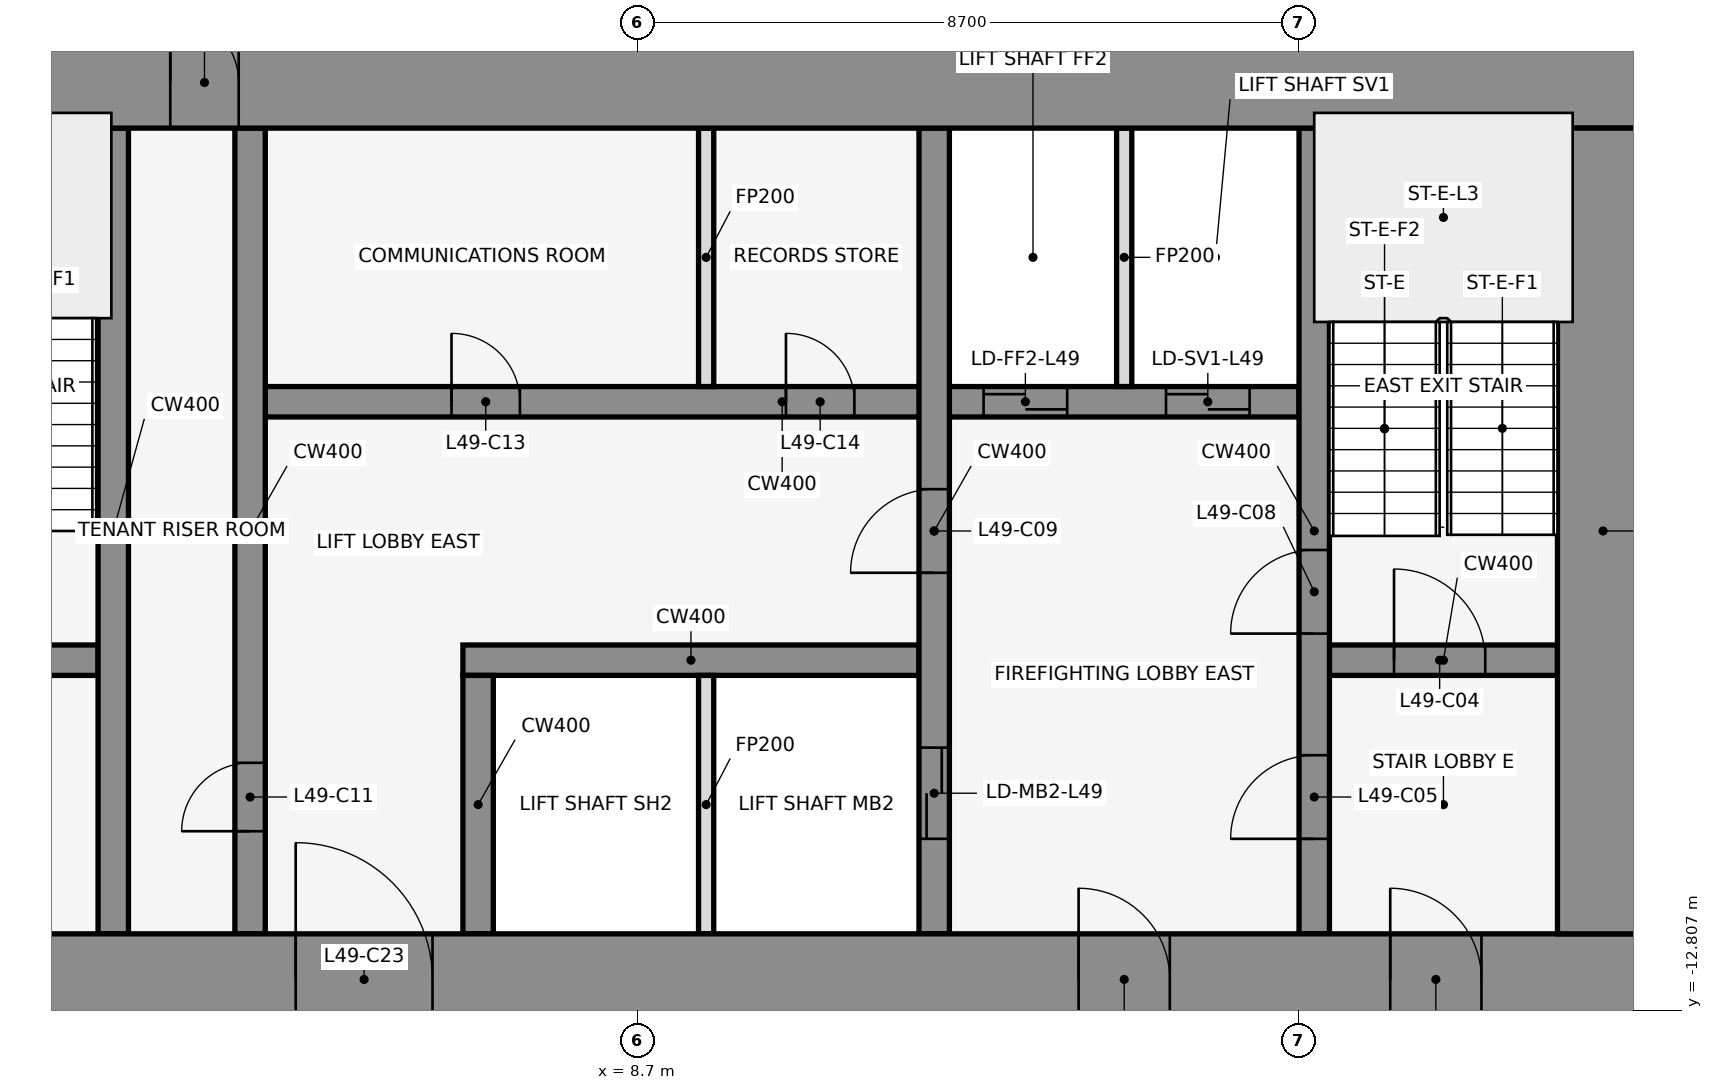
"""IFC4 building model, lengths in metres.
Left out: names, types, materials, properties, quantities, classifications, styles, units other than length and angle.
Written with IfcOpenShell. Run it as: python <this file> out.ifc"""

import sys

from ifc_helpers import new_model, si_unit, direction, frame, frame_2d, origin, place, context, subcontext, project, spatial, rectangle, extrude, element, fill, save


model = new_model("IFC4")
c1 = context("Model", 3, precision=1e-05, world=origin(), true_north=direction((0.0, 1.0)))
c2 = subcontext(c1, "Body", "Model", "MODEL_VIEW")
j1 = project(units=[si_unit("LENGTHUNIT", "METRE"), si_unit("PLANEANGLEUNIT", "RADIAN")], contexts=[c1])
p1 = place(None, origin())
s1 = spatial("IfcSite", under=j1, at=p1, CompositionType="ELEMENT")
p2 = place(p1, origin())
s2 = spatial("IfcBuilding", under=s1, at=p2, CompositionType="ELEMENT")
p3 = place(p2, frame((0.0, 0.0, 219.6)))
s3 = spatial("IfcBuildingStorey", under=s2, at=p3, CompositionType="ELEMENT", Elevation=219.6)
for number, where, z_axis, x_axis in (
    (1, (16.432, -0.105, 0.0), (0.0, 0.0, 1.0), (-0.84, 0.543, 0.0)),
    (2, (1.901, 1.08, 0.0), (0.0, 0.0, 1.0), (-0.84, -0.543, 0.0)),
):
    element("IfcWall", number, at=place(p3, frame(where, z_axis=z_axis, x_axis=x_axis)), inside=s3, PredefinedType="STANDARD", context=c2, shape_type="SweptSolid", body=[
        extrude(rectangle(XDim=2.183, YDim=0.25, at=frame_2d((1.091, 0.0))), origin(), (0.0, 0.0, 1.0), 3.95),
    ])
p4 = place(p3, frame((-1.6, -8.2, 0.0), z_axis=(0.0, 0.0, 1.0), x_axis=(1.0, 0.0, 0.0)))
e3 = element("IfcWall", 3, at=p4, inside=s3, PredefinedType="SHEAR", context=c2, shape_type="SweptSolid", body=[
    extrude(rectangle(XDim=3.2, YDim=0.4, at=frame_2d((1.6, 0.0))), origin(), (0.0, 0.0, 1.0), 4.1),
])
p5 = place(p4, frame((1.05, 0.0, 0.0)))
e4 = element("IfcOpeningElement", 4, at=p5, cuts=e3, PredefinedType="OPENING", context=c2, shape_type="SweptSolid", body=[
    extrude(rectangle(XDim=1.2, YDim=2.1, at=frame_2d((0.6, 1.05))), frame((0.0, 0.212, 0.0), z_axis=(0.0, -1.0, 0.0), x_axis=(1.0, 0.0, 0.0)), (0.0, 0.0, 1.0), 0.424),
])
p6 = place(p3, frame((6.4, -8.2, 0.0), z_axis=(0.0, 0.0, 1.0), x_axis=(1.0, 0.0, 0.0)))
e5 = element("IfcWall", 5, at=p6, inside=s3, PredefinedType="SHEAR", context=c2, shape_type="SweptSolid", body=[
    extrude(rectangle(XDim=6.0, YDim=0.4, at=frame_2d((3.0, 0.0))), origin(), (0.0, 0.0, 1.0), 4.1),
])
p7 = place(p3, frame((17.8, -8.2, 0.0), z_axis=(0.0, 0.0, 1.0), x_axis=(1.0, 0.0, 0.0)))
e6 = element("IfcWall", 6, at=p7, inside=s3, PredefinedType="SHEAR", context=c2, shape_type="SweptSolid", body=[
    extrude(rectangle(XDim=3.0, YDim=0.4, at=frame_2d((1.5, 0.0))), origin(), (0.0, 0.0, 1.0), 4.1),
])
p8 = place(p7, frame((0.85, 0.0, 0.0)))
e7 = element("IfcOpeningElement", 7, at=p8, cuts=e6, PredefinedType="OPENING", context=c2, shape_type="SweptSolid", body=[
    extrude(rectangle(XDim=1.2, YDim=2.1, at=frame_2d((0.6, 1.05))), frame((0.0, 0.212, 0.0), z_axis=(0.0, -1.0, 0.0), x_axis=(1.0, 0.0, 0.0)), (0.0, 0.0, 1.0), 0.424),
])
p9 = place(p3, frame((3.8, -4.8, 0.0), z_axis=(0.0, 0.0, 1.0), x_axis=(1.0, 0.0, 0.0)))
e8 = element("IfcWall", 8, at=p9, inside=s3, PredefinedType="SHEAR", context=c2, shape_type="SweptSolid", body=[
    extrude(rectangle(XDim=13.6, YDim=0.4, at=frame_2d((6.8, 0.0))), origin(), (0.0, 0.0, 1.0), 4.1),
])
p10 = place(p9, frame((9.45, 0.0, 0.0)))
e9 = element("IfcOpeningElement", 9, at=p10, cuts=e8, PredefinedType="OPENING", context=c2, shape_type="SweptSolid", body=[
    extrude(rectangle(XDim=1.1, YDim=2.1, at=frame_2d((0.55, 1.05))), frame((0.0, 0.212, 0.0), z_axis=(0.0, -1.0, 0.0), x_axis=(1.0, 0.0, 0.0)), (0.0, 0.0, 1.0), 0.424),
])
p11 = place(p9, frame((11.85, 0.0, 0.0)))
e10 = element("IfcOpeningElement", 10, at=p11, cuts=e8, PredefinedType="OPENING", context=c2, shape_type="SweptSolid", body=[
    extrude(rectangle(XDim=1.1, YDim=2.1, at=frame_2d((0.55, 1.05))), frame((0.0, 0.212, 0.0), z_axis=(0.0, -1.0, 0.0), x_axis=(1.0, 0.0, 0.0)), (0.0, 0.0, 1.0), 0.424),
])
p12 = place(p9, frame((2.45, 0.0, 0.0)))
e11 = element("IfcOpeningElement", 11, at=p12, cuts=e8, PredefinedType="OPENING", context=c2, shape_type="SweptSolid", body=[
    extrude(rectangle(XDim=0.9, YDim=2.1, at=frame_2d((0.45, 1.05))), frame((0.0, 0.212, 0.0), z_axis=(0.0, -1.0, 0.0), x_axis=(1.0, 0.0, 0.0)), (0.0, 0.0, 1.0), 0.424),
])
p13 = place(p9, frame((6.85, 0.0, 0.0)))
e12 = element("IfcOpeningElement", 12, at=p13, cuts=e8, PredefinedType="OPENING", context=c2, shape_type="SweptSolid", body=[
    extrude(rectangle(XDim=0.9, YDim=2.1, at=frame_2d((0.45, 1.05))), frame((0.0, 0.212, 0.0), z_axis=(0.0, -1.0, 0.0), x_axis=(1.0, 0.0, 0.0)), (0.0, 0.0, 1.0), 0.424),
])
p14 = place(p3, frame((1.8, -11.8, 0.0), z_axis=(0.0, 0.0, 1.0), x_axis=(0.0, 1.0, 0.0)))
e13 = element("IfcWall", 13, at=p14, inside=s3, PredefinedType="SHEAR", context=c2, shape_type="SweptSolid", body=[
    extrude(rectangle(XDim=10.6, YDim=0.4, at=frame_2d((5.3, 0.0))), origin(), (0.0, 0.0, 1.0), 4.1),
])
p15 = place(p3, frame((3.6, -11.8, 0.0), z_axis=(0.0, 0.0, 1.0), x_axis=(0.0, 1.0, 0.0)))
e14 = element("IfcWall", 14, at=p15, inside=s3, PredefinedType="SHEAR", context=c2, shape_type="SweptSolid", body=[
    extrude(rectangle(XDim=10.6, YDim=0.4, at=frame_2d((5.3, 0.0))), origin(), (0.0, 0.0, 1.0), 4.1),
])
p16 = place(p15, frame((1.35, 0.0, 0.0)))
e15 = element("IfcOpeningElement", 15, at=p16, cuts=e14, PredefinedType="OPENING", context=c2, shape_type="SweptSolid", body=[
    extrude(rectangle(XDim=0.9, YDim=2.1, at=frame_2d((0.45, 1.05))), frame((0.0, 0.212, 0.0), z_axis=(0.0, -1.0, 0.0), x_axis=(1.0, 0.0, 0.0)), (0.0, 0.0, 1.0), 0.424),
])
p17 = place(p3, frame((6.6, -11.8, 0.0), z_axis=(0.0, 0.0, 1.0), x_axis=(0.0, 1.0, 0.0)))
e16 = element("IfcWall", 16, at=p17, inside=s3, PredefinedType="SHEAR", context=c2, shape_type="SweptSolid", body=[
    extrude(rectangle(XDim=3.4, YDim=0.4, at=frame_2d((1.7, 0.0))), origin(), (0.0, 0.0, 1.0), 4.1),
])
for number, where, z_axis, x_axis in (
    (17, (9.6, -11.8, 0.0), (0.0, 0.0, 1.0), (0.0, 1.0, 0.0)),
    (18, (9.6, -4.6, 0.0), (0.0, 0.0, 1.0), (0.0, 1.0, 0.0)),
):
    element("IfcWall", number, at=place(p3, frame(where, z_axis=z_axis, x_axis=x_axis)), inside=s3, PredefinedType="PARTITIONING", context=c2, shape_type="SweptSolid", body=[
        extrude(rectangle(XDim=3.4, YDim=0.2, at=frame_2d((1.7, 0.0))), origin(), (0.0, 0.0, 1.0), 2.84),
    ])
p18 = place(p3, frame((12.6, -11.8, 0.0), z_axis=(0.0, 0.0, 1.0), x_axis=(0.0, 1.0, 0.0)))
e19 = element("IfcWall", 19, at=p18, inside=s3, PredefinedType="SHEAR", context=c2, shape_type="SweptSolid", body=[
    extrude(rectangle(XDim=10.6, YDim=0.4, at=frame_2d((5.3, 0.0))), origin(), (0.0, 0.0, 1.0), 4.1),
])
p19 = place(p18, frame((1.25, 0.0, 0.0)))
e20 = element("IfcOpeningElement", 20, at=p19, cuts=e19, PredefinedType="OPENING", context=c2, shape_type="SweptSolid", body=[
    extrude(rectangle(XDim=1.2, YDim=2.1, at=frame_2d((0.6, 1.05))), frame((0.0, 0.212, 0.0), z_axis=(0.0, -1.0, 0.0), x_axis=(1.0, 0.0, 0.0)), (0.0, 0.0, 1.0), 0.424),
])
p20 = place(p18, frame((4.75, 0.0, 0.0)))
e21 = element("IfcOpeningElement", 21, at=p20, cuts=e19, PredefinedType="OPENING", context=c2, shape_type="SweptSolid", body=[
    extrude(rectangle(XDim=1.1, YDim=2.1, at=frame_2d((0.55, 1.05))), frame((0.0, 0.212, 0.0), z_axis=(0.0, -1.0, 0.0), x_axis=(1.0, 0.0, 0.0)), (0.0, 0.0, 1.0), 0.424),
])
p21 = place(p3, frame((15.1, -4.6, 0.0), z_axis=(0.0, 0.0, 1.0), x_axis=(0.0, 1.0, 0.0)))
e22 = element("IfcWall", 22, at=p21, inside=s3, PredefinedType="PARTITIONING", context=c2, shape_type="SweptSolid", body=[
    extrude(rectangle(XDim=3.4, YDim=0.2, at=frame_2d((1.7, 0.0))), origin(), (0.0, 0.0, 1.0), 2.84),
])
p22 = place(p3, frame((17.6, -11.8, 0.0), z_axis=(0.0, 0.0, 1.0), x_axis=(0.0, 1.0, 0.0)))
e23 = element("IfcWall", 23, at=p22, inside=s3, PredefinedType="SHEAR", context=c2, shape_type="SweptSolid", body=[
    extrude(rectangle(XDim=10.6, YDim=0.4, at=frame_2d((5.3, 0.0))), origin(), (0.0, 0.0, 1.0), 4.1),
])
p23 = place(p22, frame((1.25, 0.0, 0.0)))
e24 = element("IfcOpeningElement", 24, at=p23, cuts=e23, PredefinedType="OPENING", context=c2, shape_type="SweptSolid", body=[
    extrude(rectangle(XDim=1.1, YDim=2.1, at=frame_2d((0.55, 1.05))), frame((0.0, 0.212, 0.0), z_axis=(0.0, -1.0, 0.0), x_axis=(1.0, 0.0, 0.0)), (0.0, 0.0, 1.0), 0.424),
])
p24 = place(p22, frame((3.95, 0.0, 0.0)))
e25 = element("IfcOpeningElement", 25, at=p24, cuts=e23, PredefinedType="OPENING", context=c2, shape_type="SweptSolid", body=[
    extrude(rectangle(XDim=1.1, YDim=2.1, at=frame_2d((0.55, 1.05))), frame((0.0, 0.212, 0.0), z_axis=(0.0, -1.0, 0.0), x_axis=(1.0, 0.0, 0.0)), (0.0, 0.0, 1.0), 0.424),
])
p25 = place(p3, frame((-22.0, -0.6, 0.0), z_axis=(0.0, 0.0, 1.0), x_axis=(1.0, 0.0, 0.0)))
e26 = element("IfcWall", 26, at=p25, inside=s3, PredefinedType="SHEAR", context=c2, shape_type="SweptSolid", body=[
    extrude(rectangle(XDim=44.0, YDim=1.2, at=frame_2d((22.0, 0.0))), origin(), (0.0, 0.0, 1.0), 4.1),
])
p26 = place(p25, frame((18.55, 0.0, 0.0)))
e27 = element("IfcOpeningElement", 27, at=p26, cuts=e26, PredefinedType="OPENING", context=c2, shape_type="SweptSolid", body=[
    extrude(rectangle(XDim=0.9, YDim=2.1, at=frame_2d((0.45, 1.05))), frame((0.0, 0.612, 0.0), z_axis=(0.0, -1.0, 0.0), x_axis=(1.0, 0.0, 0.0)), (0.0, 0.0, 1.0), 1.224),
])
p27 = place(p25, frame((24.55, 0.0, 0.0)))
e28 = element("IfcOpeningElement", 28, at=p27, cuts=e26, PredefinedType="OPENING", context=c2, shape_type="SweptSolid", body=[
    extrude(rectangle(XDim=0.9, YDim=2.1, at=frame_2d((0.45, 1.05))), frame((0.0, 0.612, 0.0), z_axis=(0.0, -1.0, 0.0), x_axis=(1.0, 0.0, 0.0)), (0.0, 0.0, 1.0), 1.224),
])
p28 = place(p3, frame((-22.0, -12.4, 0.0), z_axis=(0.0, 0.0, 1.0), x_axis=(1.0, 0.0, 0.0)))
e29 = element("IfcWall", 29, at=p28, inside=s3, PredefinedType="SHEAR", context=c2, shape_type="SweptSolid", body=[
    extrude(rectangle(XDim=44.0, YDim=1.2, at=frame_2d((22.0, 0.0))), origin(), (0.0, 0.0, 1.0), 4.1),
])
p29 = place(p28, frame((2.2, 0.0, 0.0)))
e30 = element("IfcOpeningElement", 30, at=p29, cuts=e29, PredefinedType="OPENING", context=c2, shape_type="SweptSolid", body=[
    extrude(rectangle(XDim=1.2, YDim=2.1, at=frame_2d((0.6, 1.05))), frame((0.0, 0.612, 0.0), z_axis=(0.0, -1.0, 0.0), x_axis=(1.0, 0.0, 0.0)), (0.0, 0.0, 1.0), 1.224),
])
p30 = place(p28, frame((21.4, 0.0, 0.0)))
e31 = element("IfcOpeningElement", 31, at=p30, cuts=e29, PredefinedType="OPENING", context=c2, shape_type="SweptSolid", body=[
    extrude(rectangle(XDim=1.2, YDim=2.1, at=frame_2d((0.6, 1.05))), frame((0.0, 0.612, 0.0), z_axis=(0.0, -1.0, 0.0), x_axis=(1.0, 0.0, 0.0)), (0.0, 0.0, 1.0), 1.224),
])
p31 = place(p28, frame((40.6, 0.0, 0.0)))
e32 = element("IfcOpeningElement", 32, at=p31, cuts=e29, PredefinedType="OPENING", context=c2, shape_type="SweptSolid", body=[
    extrude(rectangle(XDim=1.2, YDim=2.1, at=frame_2d((0.6, 1.05))), frame((0.0, 0.612, 0.0), z_axis=(0.0, -1.0, 0.0), x_axis=(1.0, 0.0, 0.0)), (0.0, 0.0, 1.0), 1.224),
])
p32 = place(p28, frame((16.0, 0.0, 0.0)))
e33 = element("IfcOpeningElement", 33, at=p32, cuts=e29, PredefinedType="OPENING", context=c2, shape_type="SweptSolid", body=[
    extrude(rectangle(XDim=1.8, YDim=2.1, at=frame_2d((0.9, 1.05))), frame((0.0, 0.612, 0.0), z_axis=(0.0, -1.0, 0.0), x_axis=(1.0, 0.0, 0.0)), (0.0, 0.0, 1.0), 1.224),
])
p33 = place(p28, frame((6.3, 0.0, 0.0)))
e34 = element("IfcOpeningElement", 34, at=p33, cuts=e29, PredefinedType="OPENING", context=c2, shape_type="SweptSolid", body=[
    extrude(rectangle(XDim=1.2, YDim=2.1, at=frame_2d((0.6, 1.05))), frame((0.0, 0.612, 0.0), z_axis=(0.0, -1.0, 0.0), x_axis=(1.0, 0.0, 0.0)), (0.0, 0.0, 1.0), 1.224),
])
p34 = place(p28, frame((26.2, 0.0, 0.0)))
e35 = element("IfcOpeningElement", 35, at=p34, cuts=e29, PredefinedType="OPENING", context=c2, shape_type="SweptSolid", body=[
    extrude(rectangle(XDim=1.8, YDim=2.1, at=frame_2d((0.9, 1.05))), frame((0.0, 0.612, 0.0), z_axis=(0.0, -1.0, 0.0), x_axis=(1.0, 0.0, 0.0)), (0.0, 0.0, 1.0), 1.224),
])
p35 = place(p28, frame((36.5, 0.0, 0.0)))
e36 = element("IfcOpeningElement", 36, at=p35, cuts=e29, PredefinedType="OPENING", context=c2, shape_type="SweptSolid", body=[
    extrude(rectangle(XDim=1.2, YDim=2.1, at=frame_2d((0.6, 1.05))), frame((0.0, 0.612, 0.0), z_axis=(0.0, -1.0, 0.0), x_axis=(1.0, 0.0, 0.0)), (0.0, 0.0, 1.0), 1.224),
])
p36 = place(p3, frame((21.4, -11.8, 0.0), z_axis=(0.0, 0.0, 1.0), x_axis=(0.0, 1.0, 0.0)))
e37 = element("IfcWall", 37, at=p36, inside=s3, PredefinedType="SHEAR", context=c2, shape_type="SweptSolid", body=[
    extrude(rectangle(XDim=10.6, YDim=1.2, at=frame_2d((5.3, 0.0))), origin(), (0.0, 0.0, 1.0), 4.1),
])
p37 = place(p8, origin())
e38 = element("IfcDoor", 38, at=p37, inside=s3, OperationType="SINGLE_SWING_RIGHT", PredefinedType="DOOR", context=c2, shape_type="SweptSolid", body=[
    extrude(rectangle(XDim=1.2, YDim=2.1, at=frame_2d((0.6, 1.05))), frame((0.0, 0.025, 0.0), z_axis=(0.0, -1.0, 0.0), x_axis=(1.0, 0.0, 0.0)), (0.0, 0.0, 1.0), 0.05),
])
fill(e7, e38)
p38 = place(p23, origin())
e39 = element("IfcDoor", 39, at=p38, inside=s3, OperationType="SINGLE_SWING_LEFT", PredefinedType="DOOR", context=c2, shape_type="SweptSolid", body=[
    extrude(rectangle(XDim=1.1, YDim=2.1, at=frame_2d((0.55, 1.05))), frame((0.0, 0.025, 0.0), z_axis=(0.0, -1.0, 0.0), x_axis=(1.0, 0.0, 0.0)), (0.0, 0.0, 1.0), 0.05),
])
fill(e24, e39)
p39 = place(p19, origin())
e40 = element("IfcDoor", 40, at=p39, inside=s3, OperationType="DOUBLE_DOOR_SLIDING", PredefinedType="DOOR", context=c2, shape_type="SweptSolid", body=[
    extrude(rectangle(XDim=1.2, YDim=2.1, at=frame_2d((0.6, 1.05))), frame((0.0, 0.025, 0.0), z_axis=(0.0, -1.0, 0.0), x_axis=(1.0, 0.0, 0.0)), (0.0, 0.0, 1.0), 0.05),
])
fill(e20, e40)
p40 = place(p10, origin())
e41 = element("IfcDoor", 41, at=p40, inside=s3, OperationType="DOUBLE_DOOR_SLIDING", PredefinedType="DOOR", context=c2, shape_type="SweptSolid", body=[
    extrude(rectangle(XDim=1.1, YDim=2.1, at=frame_2d((0.55, 1.05))), frame((0.0, 0.025, 0.0), z_axis=(0.0, -1.0, 0.0), x_axis=(1.0, 0.0, 0.0)), (0.0, 0.0, 1.0), 0.05),
])
fill(e9, e41)
p41 = place(p11, origin())
e42 = element("IfcDoor", 42, at=p41, inside=s3, OperationType="DOUBLE_DOOR_SLIDING", PredefinedType="DOOR", context=c2, shape_type="SweptSolid", body=[
    extrude(rectangle(XDim=1.1, YDim=2.1, at=frame_2d((0.55, 1.05))), frame((0.0, 0.025, 0.0), z_axis=(0.0, -1.0, 0.0), x_axis=(1.0, 0.0, 0.0)), (0.0, 0.0, 1.0), 0.05),
])
fill(e10, e42)
p42 = place(p24, origin())
e43 = element("IfcDoor", 43, at=p42, inside=s3, OperationType="SINGLE_SWING_RIGHT", PredefinedType="DOOR", context=c2, shape_type="SweptSolid", body=[
    extrude(rectangle(XDim=1.1, YDim=2.1, at=frame_2d((0.55, 1.05))), frame((0.0, 0.025, 0.0), z_axis=(0.0, -1.0, 0.0), x_axis=(1.0, 0.0, 0.0)), (0.0, 0.0, 1.0), 0.05),
])
fill(e25, e43)
p43 = place(p20, frame((1.1, 0.0, 0.0), z_axis=(0.0, 0.0, 1.0), x_axis=(-1.0, 0.0, 0.0)))
e44 = element("IfcDoor", 44, at=p43, inside=s3, OperationType="SINGLE_SWING_RIGHT", PredefinedType="DOOR", context=c2, shape_type="SweptSolid", body=[
    extrude(rectangle(XDim=1.1, YDim=2.1, at=frame_2d((0.55, 1.05))), frame((0.0, 0.025, 0.0), z_axis=(0.0, -1.0, 0.0), x_axis=(1.0, 0.0, 0.0)), (0.0, 0.0, 1.0), 0.05),
])
fill(e21, e44)
p44 = place(p16, origin())
e45 = element("IfcDoor", 45, at=p44, inside=s3, OperationType="SINGLE_SWING_LEFT", PredefinedType="DOOR", context=c2, shape_type="SweptSolid", body=[
    extrude(rectangle(XDim=0.9, YDim=2.1, at=frame_2d((0.45, 1.05))), frame((0.0, 0.025, 0.0), z_axis=(0.0, -1.0, 0.0), x_axis=(1.0, 0.0, 0.0)), (0.0, 0.0, 1.0), 0.05),
])
fill(e15, e45)
p45 = place(p12, origin())
e46 = element("IfcDoor", 46, at=p45, inside=s3, OperationType="SINGLE_SWING_LEFT", PredefinedType="DOOR", context=c2, shape_type="SweptSolid", body=[
    extrude(rectangle(XDim=0.9, YDim=2.1, at=frame_2d((0.45, 1.05))), frame((0.0, 0.025, 0.0), z_axis=(0.0, -1.0, 0.0), x_axis=(1.0, 0.0, 0.0)), (0.0, 0.0, 1.0), 0.05),
])
fill(e11, e46)
p46 = place(p13, origin())
e47 = element("IfcDoor", 47, at=p46, inside=s3, OperationType="SINGLE_SWING_RIGHT", PredefinedType="DOOR", context=c2, shape_type="SweptSolid", body=[
    extrude(rectangle(XDim=0.9, YDim=2.1, at=frame_2d((0.45, 1.05))), frame((0.0, 0.025, 0.0), z_axis=(0.0, -1.0, 0.0), x_axis=(1.0, 0.0, 0.0)), (0.0, 0.0, 1.0), 0.05),
])
fill(e12, e47)
p47 = place(p27, origin())
e48 = element("IfcDoor", 48, at=p47, inside=s3, OperationType="SINGLE_SWING_LEFT", PredefinedType="DOOR", context=c2, shape_type="SweptSolid", body=[
    extrude(rectangle(XDim=0.9, YDim=2.1, at=frame_2d((0.45, 1.05))), frame((0.0, 0.025, 0.0), z_axis=(0.0, -1.0, 0.0), x_axis=(1.0, 0.0, 0.0)), (0.0, 0.0, 1.0), 0.05),
])
fill(e28, e48)
p48 = place(p31, frame((1.2, 0.0, 0.0), z_axis=(0.0, 0.0, 1.0), x_axis=(-1.0, 0.0, 0.0)))
e49 = element("IfcDoor", 49, at=p48, inside=s3, OperationType="SINGLE_SWING_RIGHT", PredefinedType="DOOR", context=c2, shape_type="SweptSolid", body=[
    extrude(rectangle(XDim=1.2, YDim=2.1, at=frame_2d((0.6, 1.05))), frame((0.0, 0.025, 0.0), z_axis=(0.0, -1.0, 0.0), x_axis=(1.0, 0.0, 0.0)), (0.0, 0.0, 1.0), 0.05),
])
fill(e32, e49)
p49 = place(p34, origin())
e50 = element("IfcDoor", 50, at=p49, inside=s3, OperationType="SINGLE_SWING_LEFT", PredefinedType="DOOR", context=c2, shape_type="SweptSolid", body=[
    extrude(rectangle(XDim=1.8, YDim=2.1, at=frame_2d((0.9, 1.05))), frame((0.0, 0.025, 0.0), z_axis=(0.0, -1.0, 0.0), x_axis=(1.0, 0.0, 0.0)), (0.0, 0.0, 1.0), 0.05),
])
fill(e35, e50)
p50 = place(p35, frame((1.2, 0.0, 0.0), z_axis=(0.0, 0.0, 1.0), x_axis=(-1.0, 0.0, 0.0)))
e51 = element("IfcDoor", 51, at=p50, inside=s3, OperationType="SINGLE_SWING_RIGHT", PredefinedType="DOOR", context=c2, shape_type="SweptSolid", body=[
    extrude(rectangle(XDim=1.2, YDim=2.1, at=frame_2d((0.6, 1.05))), frame((0.0, 0.025, 0.0), z_axis=(0.0, -1.0, 0.0), x_axis=(1.0, 0.0, 0.0)), (0.0, 0.0, 1.0), 0.05),
])
fill(e36, e51)
save(model, sys.argv[1])
